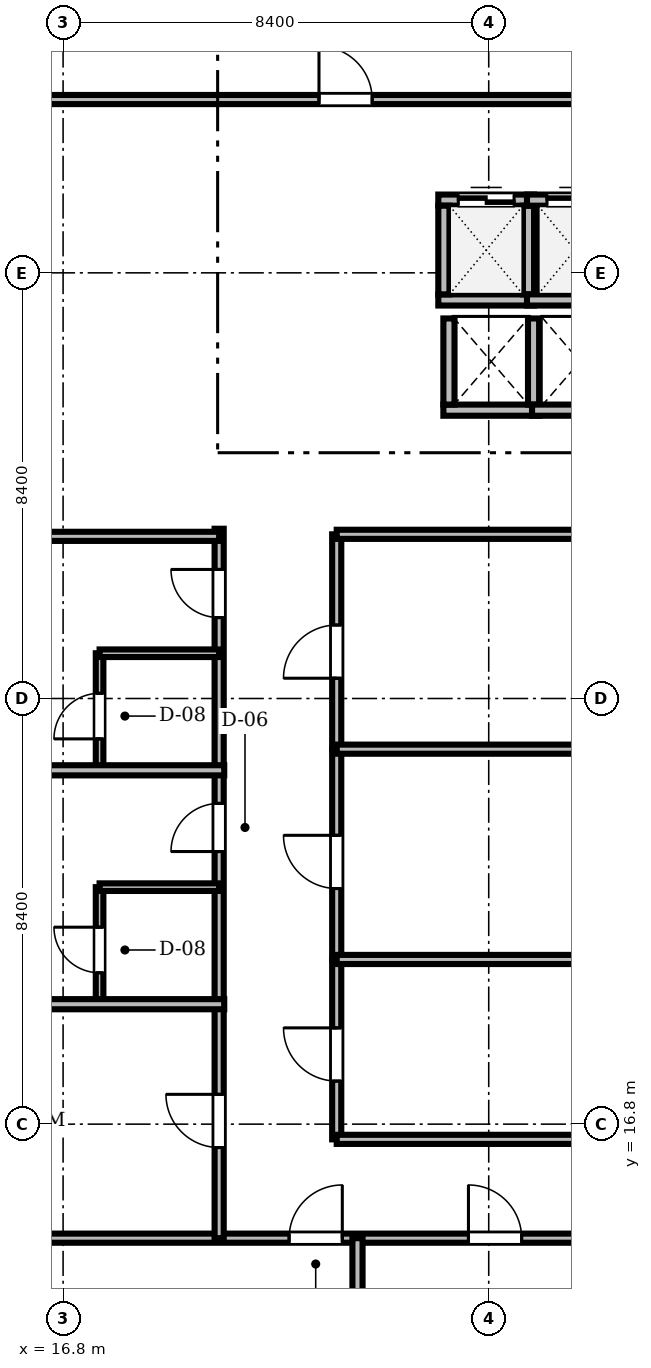
"""IFC4 building model, lengths in metres.
Left out: names, types, materials, properties, quantities, classifications, styles, units other than length and angle.
Written with IfcOpenShell. Run it as: python <this file> out.ifc"""

import sys

from ifc_helpers import new_model, si_unit, direction, frame, frame_2d, origin, place, context, subcontext, project, spatial, rectangle, extrude, source, transform, mapped, element, fill, save


model = new_model("IFC4")
c1 = context("Model", 3, precision=1e-05, world=origin(), true_north=direction((0.0, 1.0)))
c2 = subcontext(c1, "Body", "Model", "MODEL_VIEW")
j1 = project(units=[si_unit("LENGTHUNIT", "METRE"), si_unit("PLANEANGLEUNIT", "RADIAN")], contexts=[c1])
p1 = place(None, origin())
s1 = spatial("IfcSite", under=j1, at=p1, CompositionType="ELEMENT")
p2 = place(p1, origin())
s2 = spatial("IfcBuilding", under=s1, at=p2, CompositionType="ELEMENT")
p3 = place(p2, frame((0.0, 0.0, 148.3)))
s3 = spatial("IfcBuildingStorey", under=s2, at=p3, CompositionType="ELEMENT", Elevation=148.3)
m1 = source(origin(), c2, "Body", "SweptSolid", [
    extrude(rectangle(XDim=1.89, YDim=0.22, at=frame_2d((0.945, 0.0))), origin(), (0.0, 0.0, 1.0), 3.46),
])
p4 = place(p3, frame((24.205, 33.065, 0.0), z_axis=(0.0, 0.0, 1.0), x_axis=(1.0, 0.0, 0.0)))
e1 = element("IfcWall", 1, at=p4, inside=s3, PredefinedType="SOLIDWALL", context=c2, shape_type="MappedRepresentation", body=[
    mapped(m1, transform((0.0, 0.0, 0.0), scale=1.0)),
])
p5 = place(p3, frame((24.205, 35.035, 0.0), z_axis=(0.0, 0.0, 1.0), x_axis=(1.0, 0.0, 0.0)))
e2 = element("IfcWall", 2, at=p5, inside=s3, PredefinedType="SOLIDWALL", context=c2, shape_type="MappedRepresentation", body=[
    mapped(m1, transform((0.0, 0.0, 0.0), scale=1.0)),
])
m2 = source(origin(), c2, "Body", "SweptSolid", [
    extrude(rectangle(XDim=1.1, YDim=2.2, at=frame_2d((0.55, 1.1))), frame((0.0, 0.12, 0.0), z_axis=(0.0, -1.0, 0.0), x_axis=(1.0, 0.0, 0.0)), (0.0, 0.0, 1.0), 0.24),
])
p6 = place(p5, frame((0.395, 0.0, 0.0)))
e3 = element("IfcOpeningElement", 3, at=p6, cuts=e2, PredefinedType="OPENING", context=c2, shape_type="MappedRepresentation", body=[
    mapped(m2, transform((0.0, 0.0, 0.0), scale=1.0)),
])
m3 = source(origin(), c2, "Body", "SweptSolid", [
    extrude(rectangle(XDim=1.75, YDim=0.22, at=frame_2d((0.875, 0.0))), origin(), (0.0, 0.0, 1.0), 3.46),
])
for number, where, z_axis, x_axis in (
    (4, (24.315, 33.175, 0.0), (0.0, 0.0, 1.0), (0.0, 1.0, 0.0)),
    (5, (25.985, 33.175, 0.0), (0.0, 0.0, 1.0), (0.0, 1.0, 0.0)),
):
    element("IfcWall", number, at=place(p3, frame(where, z_axis=z_axis, x_axis=x_axis)), inside=s3, PredefinedType="SOLIDWALL", context=c2, shape_type="MappedRepresentation", body=[
        mapped(m3, transform((0.0, 0.0, 0.0), scale=1.0)),
    ])
p7 = place(p3, frame((25.955, 33.065, 0.0), z_axis=(0.0, 0.0, 1.0), x_axis=(1.0, 0.0, 0.0)))
e6 = element("IfcWall", 6, at=p7, inside=s3, PredefinedType="SOLIDWALL", context=c2, shape_type="MappedRepresentation", body=[
    mapped(m1, transform((0.0, 0.0, 0.0), scale=1.0)),
])
p8 = place(p3, frame((25.955, 35.035, 0.0), z_axis=(0.0, 0.0, 1.0), x_axis=(1.0, 0.0, 0.0)))
e7 = element("IfcWall", 7, at=p8, inside=s3, PredefinedType="SOLIDWALL", context=c2, shape_type="MappedRepresentation", body=[
    mapped(m1, transform((0.0, 0.0, 0.0), scale=1.0)),
])
p9 = place(p8, frame((0.395, 0.0, 0.0)))
e8 = element("IfcOpeningElement", 8, at=p9, cuts=e7, PredefinedType="OPENING", context=c2, shape_type="MappedRepresentation", body=[
    mapped(m2, transform((0.0, 0.0, 0.0), scale=1.0)),
])
m4 = source(origin(), c2, "Body", "SweptSolid", [
    extrude(rectangle(XDim=1.89, YDim=0.22, at=frame_2d((0.945, 0.0))), origin(), (0.0, 0.0, 1.0), 3.46),
])
p10 = place(p3, frame((24.305, 30.89, 0.0), z_axis=(0.0, 0.0, 1.0), x_axis=(1.0, 0.0, 0.0)))
e9 = element("IfcWall", 9, at=p10, inside=s3, PredefinedType="SOLIDWALL", context=c2, shape_type="MappedRepresentation", body=[
    mapped(m4, transform((0.0, 0.0, 0.0), scale=1.0)),
])
m5 = source(origin(), c2, "Body", "SweptSolid", [
    extrude(rectangle(XDim=1.7, YDim=0.22, at=frame_2d((0.85, 0.0))), origin(), (0.0, 0.0, 1.0), 3.46),
])
for number, where, z_axis, x_axis in (
    (10, (24.415, 31.0, 0.0), (0.0, 0.0, 1.0), (0.0, 1.0, 0.0)),
    (11, (26.085, 31.0, 0.0), (0.0, 0.0, 1.0), (0.0, 1.0, 0.0)),
):
    element("IfcWall", number, at=place(p3, frame(where, z_axis=z_axis, x_axis=x_axis)), inside=s3, PredefinedType="SOLIDWALL", context=c2, shape_type="MappedRepresentation", body=[
        mapped(m5, transform((0.0, 0.0, 0.0), scale=1.0)),
    ])
p11 = place(p3, frame((26.055, 30.89, 0.0), z_axis=(0.0, 0.0, 1.0), x_axis=(1.0, 0.0, 0.0)))
e12 = element("IfcWall", 12, at=p11, inside=s3, PredefinedType="SOLIDWALL", context=c2, shape_type="MappedRepresentation", body=[
    mapped(m4, transform((0.0, 0.0, 0.0), scale=1.0)),
])
m6 = source(origin(), c2, "Body", "SweptSolid", [
    extrude(rectangle(XDim=46.156, YDim=0.18, at=frame_2d((23.078, 0.0))), origin(), (0.0, 0.0, 1.0), 2.702),
])
p12 = place(p3, frame((6.922, 14.55, 0.0), z_axis=(0.0, 0.0, 1.0), x_axis=(1.0, 0.0, 0.0)))
e13 = element("IfcWall", 13, at=p12, inside=s3, PredefinedType="PARTITIONING", context=c2, shape_type="MappedRepresentation", body=[
    mapped(m6, transform((0.0, 0.0, 0.0), scale=1.0)),
])
m7 = source(origin(), c2, "Body", "SweptSolid", [
    extrude(rectangle(XDim=1.05, YDim=2.2, at=frame_2d((0.525, 1.1))), frame((0.0, 0.1, 0.0), z_axis=(0.0, -1.0, 0.0), x_axis=(1.0, 0.0, 0.0)), (0.0, 0.0, 1.0), 0.2),
])
p13 = place(p12, frame((14.338, 0.0, 0.0)))
e14 = element("IfcOpeningElement", 14, at=p13, cuts=e13, PredefinedType="OPENING", context=c2, shape_type="MappedRepresentation", body=[
    mapped(m7, transform((0.0, 0.0, 0.0), scale=1.0)),
])
p14 = place(p12, frame((17.878, 0.0, 0.0)))
e15 = element("IfcOpeningElement", 15, at=p14, cuts=e13, PredefinedType="OPENING", context=c2, shape_type="MappedRepresentation", body=[
    mapped(m7, transform((0.0, 0.0, 0.0), scale=1.0)),
])
p15 = place(p12, frame((23.477, 0.0, 0.0)))
e16 = element("IfcOpeningElement", 16, at=p15, cuts=e13, PredefinedType="OPENING", context=c2, shape_type="MappedRepresentation", body=[
    mapped(m7, transform((0.0, 0.0, 0.0), scale=1.0)),
])
p16 = place(p12, frame((29.256, 0.0, 0.0)))
e17 = element("IfcOpeningElement", 17, at=p16, cuts=e13, PredefinedType="OPENING", context=c2, shape_type="MappedRepresentation", body=[
    mapped(m7, transform((0.0, 0.0, 0.0), scale=1.0)),
])
p17 = place(p12, frame((35.035, 0.0, 0.0)))
e18 = element("IfcOpeningElement", 18, at=p17, cuts=e13, PredefinedType="OPENING", context=c2, shape_type="MappedRepresentation", body=[
    mapped(m7, transform((0.0, 0.0, 0.0), scale=1.0)),
])
p18 = place(p12, frame((41.766, 0.0, 0.0)))
e19 = element("IfcOpeningElement", 19, at=p18, cuts=e13, PredefinedType="OPENING", context=c2, shape_type="MappedRepresentation", body=[
    mapped(m7, transform((0.0, 0.0, 0.0), scale=1.0)),
])
m8 = source(origin(), c2, "Body", "SweptSolid", [
    extrude(rectangle(XDim=22.328, YDim=0.18, at=frame_2d((11.164, 0.0))), origin(), (0.0, 0.0, 1.0), 2.702),
])
p19 = place(p3, frame((6.922, 37.02, 0.0), z_axis=(0.0, 0.0, 1.0), x_axis=(1.0, 0.0, 0.0)))
e20 = element("IfcWall", 20, at=p19, inside=s3, PredefinedType="PARTITIONING", context=c2, shape_type="MappedRepresentation", body=[
    mapped(m8, transform((0.0, 0.0, 0.0), scale=1.0)),
])
p20 = place(p19, frame((14.928, 0.0, 0.0)))
e21 = element("IfcOpeningElement", 21, at=p20, cuts=e20, PredefinedType="OPENING", context=c2, shape_type="MappedRepresentation", body=[
    mapped(m7, transform((0.0, 0.0, 0.0), scale=1.0)),
])
m9 = source(origin(), c2, "Body", "SweptSolid", [
    extrude(rectangle(XDim=14.0, YDim=0.18, at=frame_2d((7.0, 0.0))), origin(), (0.0, 0.0, 1.0), 2.852),
])
p21 = place(p3, frame((19.88, 14.55, 0.0), z_axis=(0.0, 0.0, 1.0), x_axis=(0.0, 1.0, 0.0)))
e22 = element("IfcWall", 22, at=p21, inside=s3, PredefinedType="PARTITIONING", context=c2, shape_type="MappedRepresentation", body=[
    mapped(m9, transform((0.0, 0.0, 0.0), scale=1.0)),
])
p22 = place(p21, frame((1.788, 0.0, 0.0)))
e23 = element("IfcOpeningElement", 23, at=p22, cuts=e22, PredefinedType="OPENING", context=c2, shape_type="MappedRepresentation", body=[
    mapped(m7, transform((0.0, 0.0, 0.0), scale=1.0)),
])
m10 = source(origin(), c2, "Body", "SweptSolid", [
    extrude(rectangle(XDim=0.95, YDim=2.15, at=frame_2d((0.475, 1.075))), frame((0.0, 0.1, 0.0), z_axis=(0.0, -1.0, 0.0), x_axis=(1.0, 0.0, 0.0)), (0.0, 0.0, 1.0), 0.2),
])
p23 = place(p21, frame((7.63, 0.0, 0.0)))
e24 = element("IfcOpeningElement", 24, at=p23, cuts=e22, PredefinedType="OPENING", context=c2, shape_type="MappedRepresentation", body=[
    mapped(m10, transform((0.0, 0.0, 0.0), scale=1.0)),
])
p24 = place(p21, frame((12.247, 0.0, 0.0)))
e25 = element("IfcOpeningElement", 25, at=p24, cuts=e22, PredefinedType="OPENING", context=c2, shape_type="MappedRepresentation", body=[
    mapped(m10, transform((0.0, 0.0, 0.0), scale=1.0)),
])
m11 = source(origin(), c2, "Body", "SweptSolid", [
    extrude(rectangle(XDim=4.24, YDim=0.18, at=frame_2d((2.12, 0.0))), origin(), (0.0, 0.0, 1.0), 2.852),
])
p25 = place(p3, frame((22.2, 24.2, 0.0), z_axis=(0.0, 0.0, 1.0), x_axis=(0.0, 1.0, 0.0)))
e26 = element("IfcWall", 26, at=p25, inside=s3, PredefinedType="PARTITIONING", context=c2, shape_type="MappedRepresentation", body=[
    mapped(m11, transform((0.0, 0.0, 0.0), scale=1.0)),
])
p26 = place(p25, frame((1.4, 0.0, 0.0)))
e27 = element("IfcOpeningElement", 27, at=p26, cuts=e26, PredefinedType="OPENING", context=c2, shape_type="MappedRepresentation", body=[
    mapped(m7, transform((0.0, 0.0, 0.0), scale=1.0)),
])
m12 = source(origin(), c2, "Body", "SweptSolid", [
    extrude(rectangle(XDim=4.15, YDim=0.18, at=frame_2d((2.075, 0.0))), origin(), (0.0, 0.0, 1.0), 3.122),
])
p27 = place(p3, frame((22.2, 20.05, 0.0), z_axis=(0.0, 0.0, 1.0), x_axis=(0.0, 1.0, 0.0)))
e28 = element("IfcWall", 28, at=p27, inside=s3, PredefinedType="PARTITIONING", context=c2, shape_type="MappedRepresentation", body=[
    mapped(m12, transform((0.0, 0.0, 0.0), scale=1.0)),
])
p28 = place(p27, frame((1.4, 0.0, 0.0)))
e29 = element("IfcOpeningElement", 29, at=p28, cuts=e28, PredefinedType="OPENING", context=c2, shape_type="MappedRepresentation", body=[
    mapped(m7, transform((0.0, 0.0, 0.0), scale=1.0)),
])
m13 = source(origin(), c2, "Body", "SweptSolid", [
    extrude(rectangle(XDim=3.55, YDim=0.18, at=frame_2d((1.775, 0.0))), origin(), (0.0, 0.0, 1.0), 2.852),
])
p29 = place(p3, frame((22.2, 16.5, 0.0), z_axis=(0.0, 0.0, 1.0), x_axis=(0.0, 1.0, 0.0)))
e30 = element("IfcWall", 30, at=p29, inside=s3, PredefinedType="PARTITIONING", context=c2, shape_type="MappedRepresentation", body=[
    mapped(m13, transform((0.0, 0.0, 0.0), scale=1.0)),
])
p30 = place(p29, frame((1.15, 0.0, 0.0)))
e31 = element("IfcOpeningElement", 31, at=p30, cuts=e30, PredefinedType="OPENING", context=c2, shape_type="MappedRepresentation", body=[
    mapped(m7, transform((0.0, 0.0, 0.0), scale=1.0)),
])
m14 = source(origin(), c2, "Body", "SweptSolid", [
    extrude(rectangle(XDim=2.29, YDim=0.15, at=frame_2d((1.145, 0.0))), origin(), (0.0, 0.0, 1.0), 2.852),
])
p31 = place(p3, frame((17.52, 19.187, 0.0), z_axis=(0.0, 0.0, 1.0), x_axis=(0.0, 1.0, 0.0)))
e32 = element("IfcWall", 32, at=p31, inside=s3, PredefinedType="PARTITIONING", context=c2, shape_type="MappedRepresentation", body=[
    mapped(m14, transform((0.0, 0.0, 0.0), scale=1.0)),
])
m15 = source(origin(), c2, "Body", "SweptSolid", [
    extrude(rectangle(XDim=0.9, YDim=2.1, at=frame_2d((0.45, 1.05))), frame((0.0, 0.085, 0.0), z_axis=(0.0, -1.0, 0.0), x_axis=(1.0, 0.0, 0.0)), (0.0, 0.0, 1.0), 0.17),
])
p32 = place(p31, frame((0.6, 0.0, 0.0)))
e33 = element("IfcOpeningElement", 33, at=p32, cuts=e32, PredefinedType="OPENING", context=c2, shape_type="MappedRepresentation", body=[
    mapped(m15, transform((0.0, 0.0, 0.0), scale=1.0)),
])
m16 = source(origin(), c2, "Body", "SweptSolid", [
    extrude(rectangle(XDim=2.29, YDim=0.15, at=frame_2d((1.145, 0.0))), origin(), (0.0, 0.0, 1.0), 3.46),
])
p33 = place(p3, frame((17.52, 23.803, 0.0), z_axis=(0.0, 0.0, 1.0), x_axis=(0.0, 1.0, 0.0)))
e34 = element("IfcWall", 34, at=p33, inside=s3, PredefinedType="PARTITIONING", context=c2, shape_type="MappedRepresentation", body=[
    mapped(m16, transform((0.0, 0.0, 0.0), scale=1.0)),
])
p34 = place(p33, frame((0.6, 0.0, 0.0)))
e35 = element("IfcOpeningElement", 35, at=p34, cuts=e34, PredefinedType="OPENING", context=c2, shape_type="MappedRepresentation", body=[
    mapped(m15, transform((0.0, 0.0, 0.0), scale=1.0)),
])
m17 = source(origin(), c2, "Body", "SweptSolid", [
    extrude(rectangle(XDim=13.058, YDim=0.2, at=frame_2d((6.529, 0.0))), origin(), (0.0, 0.0, 1.0), 2.702),
])
p35 = place(p3, frame((6.922, 19.167, 0.0), z_axis=(0.0, 0.0, 1.0), x_axis=(1.0, 0.0, 0.0)))
e36 = element("IfcWall", 36, at=p35, inside=s3, PredefinedType="PARTITIONING", context=c2, shape_type="MappedRepresentation", body=[
    mapped(m17, transform((0.0, 0.0, 0.0), scale=1.0)),
])
m18 = source(origin(), c2, "Body", "SweptSolid", [
    extrude(rectangle(XDim=13.25, YDim=0.2, at=frame_2d((6.625, 0.0))), origin(), (0.0, 0.0, 1.0), 2.702),
])
p36 = place(p3, frame((6.73, 23.783, 0.0), z_axis=(0.0, 0.0, 1.0), x_axis=(1.0, 0.0, 0.0)))
e37 = element("IfcWall", 37, at=p36, inside=s3, PredefinedType="PARTITIONING", context=c2, shape_type="MappedRepresentation", body=[
    mapped(m18, transform((0.0, 0.0, 0.0), scale=1.0)),
])
m19 = source(origin(), c2, "Body", "SweptSolid", [
    extrude(rectangle(XDim=13.15, YDim=0.18, at=frame_2d((6.575, 0.0))), origin(), (0.0, 0.0, 1.0), 2.702),
])
p37 = place(p3, frame((6.73, 28.4, 0.0), z_axis=(0.0, 0.0, 1.0), x_axis=(1.0, 0.0, 0.0)))
e38 = element("IfcWall", 38, at=p37, inside=s3, PredefinedType="PARTITIONING", context=c2, shape_type="MappedRepresentation", body=[
    mapped(m19, transform((0.0, 0.0, 0.0), scale=1.0)),
])
m20 = source(origin(), c2, "Body", "SweptSolid", [
    extrude(rectangle(XDim=12.428, YDim=0.2, at=frame_2d((6.214, 0.0))), origin(), (0.0, 0.0, 1.0), 2.702),
])
p38 = place(p3, frame((22.61, 2.122, 0.0), z_axis=(0.0, 0.0, 1.0), x_axis=(0.0, 1.0, 0.0)))
e39 = element("IfcWall", 39, at=p38, inside=s3, PredefinedType="PARTITIONING", context=c2, shape_type="MappedRepresentation", body=[
    mapped(m20, transform((0.0, 0.0, 0.0), scale=1.0)),
])
m21 = source(origin(), c2, "Body", "SweptSolid", [
    extrude(rectangle(XDim=6.2, YDim=0.18, at=frame_2d((3.1, 0.0))), origin(), (0.0, 0.0, 1.0), 3.46),
])
for number, where, z_axis, x_axis in (
    (40, (22.2, 16.5, 0.0), (0.0, 0.0, 1.0), (1.0, 0.0, 0.0)),
    (41, (22.2, 20.05, 0.0), (0.0, 0.0, 1.0), (1.0, 0.0, 0.0)),
    (42, (22.2, 24.2, 0.0), (0.0, 0.0, 1.0), (1.0, 0.0, 0.0)),
    (43, (22.2, 28.44, 0.0), (0.0, 0.0, 1.0), (1.0, 0.0, 0.0)),
):
    element("IfcWall", number, at=place(p3, frame(where, z_axis=z_axis, x_axis=x_axis)), inside=s3, PredefinedType="PARTITIONING", context=c2, shape_type="MappedRepresentation", body=[
        mapped(m21, transform((0.0, 0.0, 0.0), scale=1.0)),
    ])
m22 = source(origin(), c2, "Body", "SweptSolid", [
    extrude(rectangle(XDim=2.36, YDim=0.15, at=frame_2d((1.18, 0.0))), origin(), (0.0, 0.0, 1.0), 3.46),
])
for number, where, z_axis, x_axis in (
    (44, (17.52, 21.477, 0.0), (0.0, 0.0, 1.0), (1.0, 0.0, 0.0)),
    (45, (17.52, 26.093, 0.0), (0.0, 0.0, 1.0), (1.0, 0.0, 0.0)),
):
    element("IfcWall", number, at=place(p3, frame(where, z_axis=z_axis, x_axis=x_axis)), inside=s3, PredefinedType="PARTITIONING", context=c2, shape_type="MappedRepresentation", body=[
        mapped(m22, transform((0.0, 0.0, 0.0), scale=1.0)),
    ])
m23 = source(origin(), c2, "Body", "SweptSolid", [
    extrude(rectangle(XDim=1.1, YDim=2.2, at=frame_2d((0.55, 1.1))), frame((0.0, 0.025, 0.0), z_axis=(0.0, -1.0, 0.0), x_axis=(1.0, 0.0, 0.0)), (0.0, 0.0, 1.0), 0.05),
])
p39 = place(p6, origin())
e46 = element("IfcDoor", 46, at=p39, inside=s3, OperationType="DOUBLE_DOOR_SLIDING", PredefinedType="DOOR", context=c2, shape_type="MappedRepresentation", body=[
    mapped(m23, transform((0.0, 0.0, 0.0), scale=1.0)),
])
fill(e3, e46)
p40 = place(p9, origin())
e47 = element("IfcDoor", 47, at=p40, inside=s3, OperationType="DOUBLE_DOOR_SLIDING", PredefinedType="DOOR", context=c2, shape_type="MappedRepresentation", body=[
    mapped(m23, transform((0.0, 0.0, 0.0), scale=1.0)),
])
fill(e8, e47)
m24 = source(origin(), c2, "Body", "SweptSolid", [
    extrude(rectangle(XDim=1.05, YDim=2.2, at=frame_2d((0.525, 1.1))), frame((0.0, 0.025, 0.0), z_axis=(0.0, -1.0, 0.0), x_axis=(1.0, 0.0, 0.0)), (0.0, 0.0, 1.0), 0.05),
])
p41 = place(p13, origin())
e48 = element("IfcDoor", 48, at=p41, inside=s3, OperationType="SINGLE_SWING_RIGHT", PredefinedType="DOOR", context=c2, shape_type="MappedRepresentation", body=[
    mapped(m24, transform((0.0, 0.0, 0.0), scale=1.0)),
])
fill(e14, e48)
p42 = place(p14, origin())
e49 = element("IfcDoor", 49, at=p42, inside=s3, OperationType="SINGLE_SWING_LEFT", PredefinedType="DOOR", context=c2, shape_type="MappedRepresentation", body=[
    mapped(m24, transform((0.0, 0.0, 0.0), scale=1.0)),
])
fill(e15, e49)
p43 = place(p20, origin())
e50 = element("IfcDoor", 50, at=p43, inside=s3, OperationType="SINGLE_SWING_LEFT", PredefinedType="DOOR", context=c2, shape_type="MappedRepresentation", body=[
    mapped(m24, transform((0.0, 0.0, 0.0), scale=1.0)),
])
fill(e21, e50)
p44 = place(p22, origin())
e51 = element("IfcDoor", 51, at=p44, inside=s3, OperationType="SINGLE_SWING_RIGHT", PredefinedType="DOOR", context=c2, shape_type="MappedRepresentation", body=[
    mapped(m24, transform((0.0, 0.0, 0.0), scale=1.0)),
])
fill(e23, e51)
m25 = source(origin(), c2, "Body", "SweptSolid", [
    extrude(rectangle(XDim=0.95, YDim=2.15, at=frame_2d((0.475, 1.075))), frame((0.0, 0.025, 0.0), z_axis=(0.0, -1.0, 0.0), x_axis=(1.0, 0.0, 0.0)), (0.0, 0.0, 1.0), 0.05),
])
p45 = place(p23, origin())
e52 = element("IfcDoor", 52, at=p45, inside=s3, OperationType="SINGLE_SWING_LEFT", PredefinedType="DOOR", context=c2, shape_type="MappedRepresentation", body=[
    mapped(m25, transform((0.0, 0.0, 0.0), scale=1.0)),
])
fill(e24, e52)
p46 = place(p24, origin())
e53 = element("IfcDoor", 53, at=p46, inside=s3, OperationType="SINGLE_SWING_RIGHT", PredefinedType="DOOR", context=c2, shape_type="MappedRepresentation", body=[
    mapped(m25, transform((0.0, 0.0, 0.0), scale=1.0)),
])
fill(e25, e53)
p47 = place(p26, origin())
e54 = element("IfcDoor", 54, at=p47, inside=s3, OperationType="SINGLE_SWING_LEFT", PredefinedType="DOOR", context=c2, shape_type="MappedRepresentation", body=[
    mapped(m24, transform((0.0, 0.0, 0.0), scale=1.0)),
])
fill(e27, e54)
p48 = place(p28, origin())
e55 = element("IfcDoor", 55, at=p48, inside=s3, OperationType="SINGLE_SWING_RIGHT", PredefinedType="DOOR", context=c2, shape_type="MappedRepresentation", body=[
    mapped(m24, transform((0.0, 0.0, 0.0), scale=1.0)),
])
fill(e29, e55)
p49 = place(p30, origin())
e56 = element("IfcDoor", 56, at=p49, inside=s3, OperationType="SINGLE_SWING_RIGHT", PredefinedType="DOOR", context=c2, shape_type="MappedRepresentation", body=[
    mapped(m24, transform((0.0, 0.0, 0.0), scale=1.0)),
])
fill(e31, e56)
m26 = source(origin(), c2, "Body", "SweptSolid", [
    extrude(rectangle(XDim=0.9, YDim=2.1, at=frame_2d((0.45, 1.05))), frame((0.0, 0.025, 0.0), z_axis=(0.0, -1.0, 0.0), x_axis=(1.0, 0.0, 0.0)), (0.0, 0.0, 1.0), 0.05),
])
p50 = place(p32, origin())
e57 = element("IfcDoor", 57, at=p50, inside=s3, OperationType="SINGLE_SWING_RIGHT", PredefinedType="DOOR", context=c2, shape_type="MappedRepresentation", body=[
    mapped(m26, transform((0.0, 0.0, 0.0), scale=1.0)),
])
fill(e33, e57)
p51 = place(p34, origin())
e58 = element("IfcDoor", 58, at=p51, inside=s3, OperationType="SINGLE_SWING_LEFT", PredefinedType="DOOR", context=c2, shape_type="MappedRepresentation", body=[
    mapped(m26, transform((0.0, 0.0, 0.0), scale=1.0)),
])
fill(e35, e58)
save(model, sys.argv[1])
